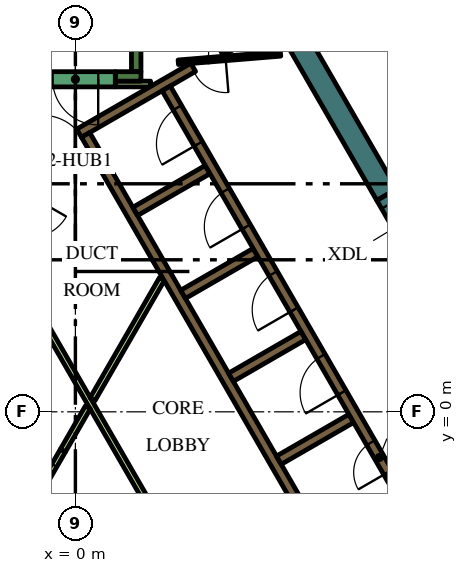
"""IFC4 building model, lengths in metres.
Left out: names, types, materials, properties, quantities, classifications, styles, units other than length and angle.
Written with IfcOpenShell. Run it as: python <this file> out.ifc"""

import sys

from ifc_helpers import new_model, si_unit, direction, frame, frame_2d, origin, place, context, subcontext, project, spatial, rectangle, extrude, element, fill, save


model = new_model("IFC4")
c1 = context("Model", 3, precision=1e-05, world=origin(), true_north=direction((0.0, 1.0)))
c2 = subcontext(c1, "Body", "Model", "MODEL_VIEW")
j1 = project(units=[si_unit("LENGTHUNIT", "METRE"), si_unit("PLANEANGLEUNIT", "RADIAN")], contexts=[c1])
p1 = place(None, origin())
s1 = spatial("IfcSite", under=j1, at=p1, CompositionType="ELEMENT")
p2 = place(p1, origin())
s2 = spatial("IfcBuilding", under=s1, at=p2, CompositionType="ELEMENT")
p3 = place(p2, frame((0.0, 0.0, 271.2)))
s3 = spatial("IfcBuildingStorey", under=s2, at=p3, CompositionType="ELEMENT", Elevation=271.2)
p4 = place(p3, frame((1.989, 16.456, 0.0), z_axis=(0.0, 0.0, 1.0), x_axis=(0.49999102663, -0.8660305845, 0.0)))
e1 = element("IfcWall", 1, at=p4, inside=s3, PredefinedType="SOLIDWALL", context=c2, shape_type="SweptSolid", body=[
    extrude(rectangle(XDim=12.406, YDim=0.6, at=frame_2d((6.203, 0.0))), origin(), (0.0, 0.0, 1.0), 4.2),
])
p5 = place(p3, frame((1.6, 8.95, 0.0), z_axis=(0.0, 0.0, 1.0), x_axis=(0.0, 1.0, 0.0)))
e2 = element("IfcWall", 2, at=p5, inside=s3, PredefinedType="SOLIDWALL", context=c2, shape_type="SweptSolid", body=[
    extrude(rectangle(XDim=6.8, YDim=0.25, at=frame_2d((3.4, 0.0))), origin(), (0.0, 0.0, 1.0), 4.2),
])
p6 = place(p3, frame((1.05, 8.825, 0.0), z_axis=(0.0, 0.0, 1.0), x_axis=(1.0, 0.0, 0.0)))
e3 = element("IfcWall", 3, at=p6, inside=s3, PredefinedType="SOLIDWALL", context=c2, shape_type="SweptSolid", body=[
    extrude(rectangle(XDim=0.675, YDim=0.25, at=frame_2d((0.337, 0.0))), origin(), (0.0, 0.0, 1.0), 4.2),
])
p7 = place(p3, frame((9.19, -1.969, 0.0), z_axis=(0.0, 0.0, 1.0), x_axis=(-0.866057109641, -0.499945079824, 0.0)))
e4 = element("IfcWall", 4, at=p7, inside=s3, PredefinedType="SOLIDWALL", context=c2, shape_type="SweptSolid", body=[
    extrude(rectangle(XDim=3.291, YDim=0.25, at=frame_2d((1.646, 0.0))), origin(), (0.0, 0.0, 1.0), 4.2),
])
p8 = place(p3, frame((3.1, 9.064, 0.0), z_axis=(0.0, 0.0, 1.0), x_axis=(-0.866033137035, -0.499986605379, 0.0)))
e5 = element("IfcWall", 5, at=p8, inside=s3, PredefinedType="SOLIDWALL", context=c2, shape_type="SweptSolid", body=[
    extrude(rectangle(XDim=3.467, YDim=0.25, at=frame_2d((1.733, 0.0))), origin(), (0.0, 0.0, 1.0), 4.2),
])
p9 = place(p3, frame((0.268, 7.285, 0.0), z_axis=(0.0, 0.0, 1.0), x_axis=(0.500098681536, -0.865968422476, 0.0)))
e6 = element("IfcWall", 6, at=p9, inside=s3, PredefinedType="SOLIDWALL", context=c2, shape_type="SweptSolid", body=[
    extrude(rectangle(XDim=0.636, YDim=0.25, at=frame_2d((0.318, 0.0))), origin(), (0.0, 0.0, 1.0), 4.2),
])
p10 = place(p3, frame((5.97, -2.591, 0.0), z_axis=(0.0, 0.0, 1.0), x_axis=(-0.499994469932, 0.866028596547, 0.0)))
e7 = element("IfcWall", 7, at=p10, inside=s3, PredefinedType="SOLIDWALL", context=c2, shape_type="SweptSolid", body=[
    extrude(rectangle(XDim=10.488, YDim=0.25, at=frame_2d((5.244, 0.0))), origin(), (0.0, 0.0, 1.0), 4.2),
])
p11 = place(p3, frame((1.574, 5.274, 0.0), z_axis=(0.0, 0.0, 1.0), x_axis=(0.866028486751, 0.499994660107, 0.0)))
e8 = element("IfcWall", 8, at=p11, inside=s3, PredefinedType="SOLIDWALL", context=c2, shape_type="SweptSolid", body=[
    extrude(rectangle(XDim=2.2, YDim=0.25, at=frame_2d((1.1, 0.0))), origin(), (0.0, 0.0, 1.0), 4.2),
])
for number, where, z_axis, x_axis in (
    (9, (2.834, 3.091, 0.0), (0.0, 0.0, 1.0), (0.866, 0.5, 0.0)),
    (10, (4.094, 0.909, 0.0), (0.0, 0.0, 1.0), (0.866, 0.5, 0.0)),
    (11, (5.354, -1.274, 0.0), (0.0, 0.0, 1.0), (0.866, 0.5, 0.0)),
):
    element("IfcWall", number, at=place(p3, frame(where, z_axis=z_axis, x_axis=x_axis)), inside=s3, PredefinedType="SOLIDWALL", context=c2, shape_type="SweptSolid", body=[
        extrude(rectangle(XDim=2.2, YDim=0.25, at=frame_2d((1.1, 0.0))), origin(), (0.0, 0.0, 1.0), 4.2),
    ])
p12 = place(p3, frame((3.83, 9.486, 0.0), z_axis=(0.0, 0.0, 1.0), x_axis=(0.865986202621, 0.500067892261, 0.0)))
e12 = element("IfcWall", 12, at=p12, inside=s3, PredefinedType="SOLIDWALL", context=c2, shape_type="SweptSolid", body=[
    extrude(rectangle(XDim=1.591, YDim=0.25, at=frame_2d((0.795, 0.0))), origin(), (0.0, 0.0, 1.0), 4.2),
])
p13 = place(p3, frame((1.05, 8.625, 0.0), z_axis=(0.0, 0.0, 1.0), x_axis=(1.0, 0.0, 0.0)))
e13 = element("IfcWall", 13, at=p13, inside=s3, PredefinedType="PARTITIONING", context=c2, shape_type="SweptSolid", body=[
    extrude(rectangle(XDim=0.929, YDim=0.15, at=frame_2d((0.464, 0.0))), origin(), (0.0, 0.0, 1.0), 3.55),
])
p14 = place(p3, frame((-1.887, 4.168, 0.0), z_axis=(0.0, 0.0, 1.0), x_axis=(0.499997069472, -0.866027095719, 0.0)))
e14 = element("IfcWall", 14, at=p14, inside=s3, PredefinedType="PARTITIONING", context=c2, shape_type="SweptSolid", body=[
    extrude(rectangle(XDim=9.106, YDim=0.15, at=frame_2d((4.553, 0.0))), origin(), (0.0, 0.0, 1.0), 3.55),
])
p15 = place(p3, frame((-0.329, -1.021, 0.0), z_axis=(0.0, 0.0, 1.0), x_axis=(0.500033191285, 0.866006239939, 0.0)))
e15 = element("IfcWall", 15, at=p15, inside=s3, PredefinedType="PARTITIONING", context=c2, shape_type="SweptSolid", body=[
    extrude(rectangle(XDim=1.315, YDim=0.15, at=frame_2d((0.657, 0.0))), origin(), (0.0, 0.0, 1.0), 3.55),
])
p16 = place(p3, frame((2.277, 3.493, 0.0), z_axis=(0.0, 0.0, 1.0), x_axis=(-0.499994550825, -0.866028549844, 0.0)))
e16 = element("IfcWall", 16, at=p16, inside=s3, PredefinedType="PARTITIONING", context=c2, shape_type="SweptSolid", body=[
    extrude(rectangle(XDim=3.65, YDim=0.15, at=frame_2d((1.825, 0.0))), origin(), (0.0, 0.0, 1.0), 3.55),
])
p17 = place(p3, frame((8.565, -2.185, 0.0), z_axis=(0.0, 0.0, 1.0), x_axis=(-0.499997954832, 0.866026584559, 0.0)))
e17 = element("IfcWall", 17, at=p17, inside=s3, PredefinedType="SOLIDWALL", context=c2, shape_type="SweptSolid", body=[
    extrude(rectangle(XDim=12.35, YDim=0.25, at=frame_2d((6.175, 0.0))), origin(), (0.0, 0.0, 1.0), 4.2),
])
p18 = place(p17, frame((0.685, 0.0, 0.0)))
e18 = element("IfcOpeningElement", 18, at=p18, cuts=e17, PredefinedType="OPENING", context=c2, shape_type="SweptSolid", body=[
    extrude(rectangle(XDim=0.9, YDim=2.1, at=frame_2d((0.45, 1.05))), frame((0.0, 0.135, 0.0), z_axis=(0.0, -1.0, 0.0), x_axis=(1.0, 0.0, 0.0)), (0.0, 0.0, 1.0), 0.27),
])
p19 = place(p17, frame((3.105, 0.0, 0.0)))
e19 = element("IfcOpeningElement", 19, at=p19, cuts=e17, PredefinedType="OPENING", context=c2, shape_type="SweptSolid", body=[
    extrude(rectangle(XDim=1.1, YDim=2.1, at=frame_2d((0.55, 1.05))), frame((0.0, 0.135, 0.0), z_axis=(0.0, -1.0, 0.0), x_axis=(1.0, 0.0, 0.0)), (0.0, 0.0, 1.0), 0.27),
])
p20 = place(p17, frame((5.625, 0.0, 0.0)))
e20 = element("IfcOpeningElement", 20, at=p20, cuts=e17, PredefinedType="OPENING", context=c2, shape_type="SweptSolid", body=[
    extrude(rectangle(XDim=1.1, YDim=2.1, at=frame_2d((0.55, 1.05))), frame((0.0, 0.135, 0.0), z_axis=(0.0, -1.0, 0.0), x_axis=(1.0, 0.0, 0.0)), (0.0, 0.0, 1.0), 0.27),
])
p21 = place(p17, frame((8.145, 0.0, 0.0)))
e21 = element("IfcOpeningElement", 21, at=p21, cuts=e17, PredefinedType="OPENING", context=c2, shape_type="SweptSolid", body=[
    extrude(rectangle(XDim=1.1, YDim=2.1, at=frame_2d((0.55, 1.05))), frame((0.0, 0.135, 0.0), z_axis=(0.0, -1.0, 0.0), x_axis=(1.0, 0.0, 0.0)), (0.0, 0.0, 1.0), 0.27),
])
p22 = place(p17, frame((10.665, 0.0, 0.0)))
e22 = element("IfcOpeningElement", 22, at=p22, cuts=e17, PredefinedType="OPENING", context=c2, shape_type="SweptSolid", body=[
    extrude(rectangle(XDim=1.1, YDim=2.1, at=frame_2d((0.55, 1.05))), frame((0.0, 0.135, 0.0), z_axis=(0.0, -1.0, 0.0), x_axis=(1.0, 0.0, 0.0)), (0.0, 0.0, 1.0), 0.27),
])
p23 = place(p3, frame((1.05, 8.75, 0.0), z_axis=(0.0, 0.0, 1.0), x_axis=(-1.0, 0.0, 0.0)))
e23 = element("IfcWall", 23, at=p23, inside=s3, PredefinedType="SOLIDWALL", context=c2, shape_type="SweptSolid", body=[
    extrude(rectangle(XDim=2.1, YDim=0.4, at=frame_2d((1.05, 0.0))), origin(), (0.0, 0.0, 1.0), 4.2),
])
p24 = place(p23, frame((0.45, 0.0, 0.0)))
e24 = element("IfcOpeningElement", 24, at=p24, cuts=e23, PredefinedType="OPENING", context=c2, shape_type="SweptSolid", body=[
    extrude(rectangle(XDim=1.2, YDim=2.1, at=frame_2d((0.6, 1.05))), frame((0.0, 0.21, 0.0), z_axis=(0.0, -1.0, 0.0), x_axis=(1.0, 0.0, 0.0)), (0.0, 0.0, 1.0), 0.42),
])
p25 = place(p3, frame((5.398, 9.419, 0.0), z_axis=(0.0, 0.0, 1.0), x_axis=(-0.996653416376, -0.081743303248, 0.0)))
e25 = element("IfcWall", 25, at=p25, inside=s3, PredefinedType="PARTITIONING", context=c2, shape_type="SweptSolid", body=[
    extrude(rectangle(XDim=2.7, YDim=0.12, at=frame_2d((1.35, 0.0))), origin(), (0.0, 0.0, 1.0), 3.55),
])
p26 = place(p25, frame((1.45, 0.0, 0.0)))
e26 = element("IfcOpeningElement", 26, at=p26, cuts=e25, PredefinedType="OPENING", context=c2, shape_type="SweptSolid", body=[
    extrude(rectangle(XDim=0.9, YDim=2.1, at=frame_2d((0.45, 1.05))), frame((0.0, 0.07, 0.0), z_axis=(0.0, -1.0, 0.0), x_axis=(1.0, 0.0, 0.0)), (0.0, 0.0, 1.0), 0.14),
])
p27 = place(p3, frame((-1.303, 6.6, 0.0), z_axis=(0.0, 0.0, 1.0), x_axis=(1.0, 0.0, 0.0)))
e27 = element("IfcWall", 27, at=p27, inside=s3, PredefinedType="PARTITIONING", context=c2, shape_type="SweptSolid", body=[
    extrude(rectangle(XDim=2.1, YDim=0.15, at=frame_2d((1.05, 0.0))), origin(), (0.0, 0.0, 1.0), 4.2),
])
p28 = place(p27, frame((0.45, 0.0, 0.0)))
e28 = element("IfcOpeningElement", 28, at=p28, cuts=e27, PredefinedType="OPENING", context=c2, shape_type="SweptSolid", body=[
    extrude(rectangle(XDim=1.2, YDim=2.1, at=frame_2d((0.6, 1.05))), frame((0.0, 0.085, 0.0), z_axis=(0.0, -1.0, 0.0), x_axis=(1.0, 0.0, 0.0)), (0.0, 0.0, 1.0), 0.17),
])
p29 = place(p3, frame((8.192, 5.711, 0.0), z_axis=(0.0, 0.0, 1.0), x_axis=(0.500062241894, -0.865989465428, 0.0)))
e29 = element("IfcWall", 29, at=p29, inside=s3, PredefinedType="SOLIDWALL", context=c2, shape_type="SweptSolid", body=[
    extrude(rectangle(XDim=1.7, YDim=0.6, at=frame_2d((0.85, 0.0))), origin(), (0.0, 0.0, 1.0), 4.2),
])
p30 = place(p29, frame((0.25, 0.0, 0.0)))
e30 = element("IfcOpeningElement", 30, at=p30, cuts=e29, PredefinedType="OPENING", context=c2, shape_type="SweptSolid", body=[
    extrude(rectangle(XDim=1.2, YDim=2.1, at=frame_2d((0.6, 1.05))), frame((0.0, 0.31, 0.0), z_axis=(0.0, -1.0, 0.0), x_axis=(1.0, 0.0, 0.0)), (0.0, 0.0, 1.0), 0.62),
])
p31 = place(p3, frame((-1.229, -2.579, 0.0), z_axis=(0.0, 0.0, 1.0), x_axis=(0.500062916607, 0.865989075817, 0.0)))
e31 = element("IfcWall", 31, at=p31, inside=s3, PredefinedType="PARTITIONING", context=c2, shape_type="SweptSolid", body=[
    extrude(rectangle(XDim=1.8, YDim=0.15, at=frame_2d((0.9, 0.0))), origin(), (0.0, 0.0, 1.0), 3.55),
])
p32 = place(p31, frame((0.45, 0.0, 0.0)))
e32 = element("IfcOpeningElement", 32, at=p32, cuts=e31, PredefinedType="OPENING", context=c2, shape_type="SweptSolid", body=[
    extrude(rectangle(XDim=0.9, YDim=2.1, at=frame_2d((0.45, 1.05))), frame((0.0, 0.085, 0.0), z_axis=(0.0, -1.0, 0.0), x_axis=(1.0, 0.0, 0.0)), (0.0, 0.0, 1.0), 0.17),
])
p33 = place(p3, frame((13.436, 0.829, 0.0), z_axis=(0.0, 0.0, 1.0), x_axis=(-0.49999894854, 0.866026010844, 0.0)))
e33 = element("IfcWall", 33, at=p33, inside=s3, PredefinedType="PARTITIONING", context=c2, shape_type="SweptSolid", body=[
    extrude(rectangle(XDim=12.0, YDim=0.2, at=frame_2d((6.0, 0.0))), origin(), (0.0, 0.0, 1.0), 3.55),
])
p34 = place(p33, frame((5.5, 0.0, 0.0)))
e34 = element("IfcOpeningElement", 34, at=p34, cuts=e33, PredefinedType="OPENING", context=c2, shape_type="SweptSolid", body=[
    extrude(rectangle(XDim=1.0, YDim=2.1, at=frame_2d((0.5, 1.05))), frame((0.0, 0.11, 0.0), z_axis=(0.0, -1.0, 0.0), x_axis=(1.0, 0.0, 0.0)), (0.0, 0.0, 1.0), 0.22),
])
p35 = place(p18, origin())
e35 = element("IfcDoor", 35, at=p35, inside=s3, OperationType="SINGLE_SWING_LEFT", PredefinedType="DOOR", context=c2, shape_type="SweptSolid", body=[
    extrude(rectangle(XDim=0.9, YDim=2.1, at=frame_2d((0.45, 1.05))), frame((0.0, 0.025, 0.0), z_axis=(0.0, -1.0, 0.0), x_axis=(1.0, 0.0, 0.0)), (0.0, 0.0, 1.0), 0.05),
])
fill(e18, e35)
p36 = place(p19, origin())
e36 = element("IfcDoor", 36, at=p36, inside=s3, OperationType="DOUBLE_DOOR_SLIDING", PredefinedType="DOOR", context=c2, shape_type="SweptSolid", body=[
    extrude(rectangle(XDim=1.1, YDim=2.1, at=frame_2d((0.55, 1.05))), frame((0.0, 0.025, 0.0), z_axis=(0.0, -1.0, 0.0), x_axis=(1.0, 0.0, 0.0)), (0.0, 0.0, 1.0), 0.05),
])
fill(e19, e36)
p37 = place(p20, origin())
e37 = element("IfcDoor", 37, at=p37, inside=s3, OperationType="DOUBLE_DOOR_SLIDING", PredefinedType="DOOR", context=c2, shape_type="SweptSolid", body=[
    extrude(rectangle(XDim=1.1, YDim=2.1, at=frame_2d((0.55, 1.05))), frame((0.0, 0.025, 0.0), z_axis=(0.0, -1.0, 0.0), x_axis=(1.0, 0.0, 0.0)), (0.0, 0.0, 1.0), 0.05),
])
fill(e20, e37)
p38 = place(p21, origin())
e38 = element("IfcDoor", 38, at=p38, inside=s3, OperationType="DOUBLE_DOOR_SLIDING", PredefinedType="DOOR", context=c2, shape_type="SweptSolid", body=[
    extrude(rectangle(XDim=1.1, YDim=2.1, at=frame_2d((0.55, 1.05))), frame((0.0, 0.025, 0.0), z_axis=(0.0, -1.0, 0.0), x_axis=(1.0, 0.0, 0.0)), (0.0, 0.0, 1.0), 0.05),
])
fill(e21, e38)
p39 = place(p22, origin())
e39 = element("IfcDoor", 39, at=p39, inside=s3, OperationType="DOUBLE_DOOR_SLIDING", PredefinedType="DOOR", context=c2, shape_type="SweptSolid", body=[
    extrude(rectangle(XDim=1.1, YDim=2.1, at=frame_2d((0.55, 1.05))), frame((0.0, 0.025, 0.0), z_axis=(0.0, -1.0, 0.0), x_axis=(1.0, 0.0, 0.0)), (0.0, 0.0, 1.0), 0.05),
])
fill(e22, e39)
p40 = place(p24, origin())
e40 = element("IfcDoor", 40, at=p40, inside=s3, OperationType="SINGLE_SWING_LEFT", PredefinedType="DOOR", context=c2, shape_type="SweptSolid", body=[
    extrude(rectangle(XDim=1.2, YDim=2.1, at=frame_2d((0.6, 1.05))), frame((0.0, 0.025, 0.0), z_axis=(0.0, -1.0, 0.0), x_axis=(1.0, 0.0, 0.0)), (0.0, 0.0, 1.0), 0.05),
])
fill(e24, e40)
p41 = place(p26, origin())
e41 = element("IfcDoor", 41, at=p41, inside=s3, OperationType="SINGLE_SWING_LEFT", PredefinedType="DOOR", context=c2, shape_type="SweptSolid", body=[
    extrude(rectangle(XDim=0.9, YDim=2.1, at=frame_2d((0.45, 1.05))), frame((0.0, 0.025, 0.0), z_axis=(0.0, -1.0, 0.0), x_axis=(1.0, 0.0, 0.0)), (0.0, 0.0, 1.0), 0.05),
])
fill(e26, e41)
p42 = place(p28, origin())
e42 = element("IfcDoor", 42, at=p42, inside=s3, OperationType="SINGLE_SWING_LEFT", PredefinedType="DOOR", context=c2, shape_type="SweptSolid", body=[
    extrude(rectangle(XDim=1.2, YDim=2.1, at=frame_2d((0.6, 1.05))), frame((0.0, 0.025, 0.0), z_axis=(0.0, -1.0, 0.0), x_axis=(1.0, 0.0, 0.0)), (0.0, 0.0, 1.0), 0.05),
])
fill(e28, e42)
p43 = place(p32, origin())
e43 = element("IfcDoor", 43, at=p43, inside=s3, OperationType="SINGLE_SWING_LEFT", PredefinedType="DOOR", context=c2, shape_type="SweptSolid", body=[
    extrude(rectangle(XDim=0.9, YDim=2.1, at=frame_2d((0.45, 1.05))), frame((0.0, 0.025, 0.0), z_axis=(0.0, -1.0, 0.0), x_axis=(1.0, 0.0, 0.0)), (0.0, 0.0, 1.0), 0.05),
])
fill(e32, e43)
save(model, sys.argv[1])
